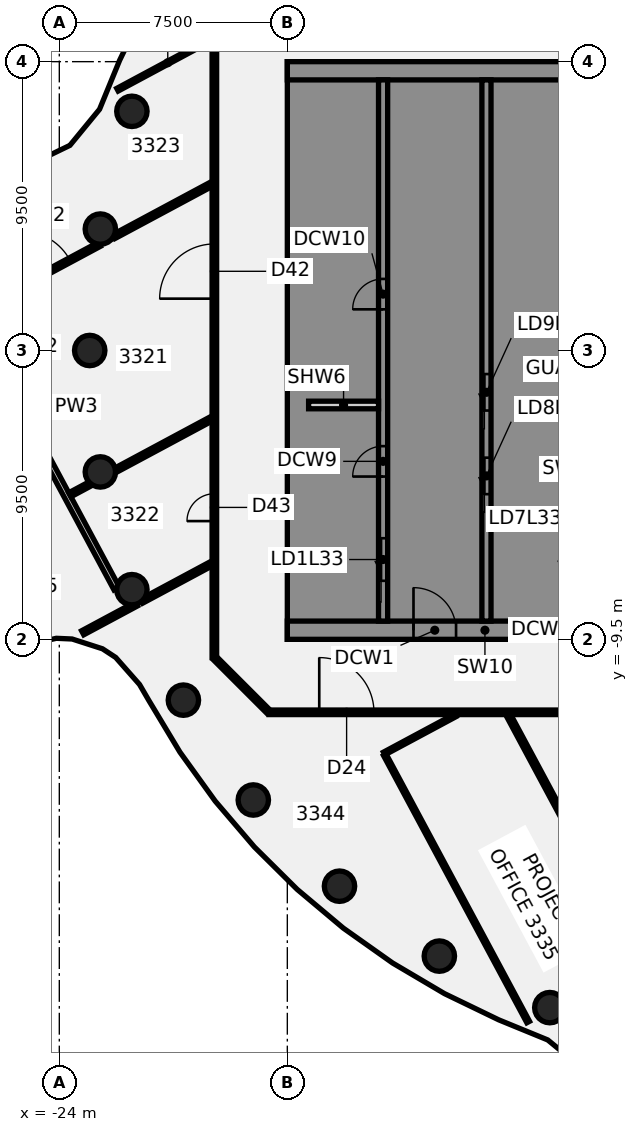
"""IFC4 building model, lengths in metres.
Left out: names, types, materials, properties, quantities, classifications, styles, units other than length and angle.
Written with IfcOpenShell. Run it as: python <this file> out.ifc"""

import sys

from ifc_helpers import new_model, si_unit, direction, frame, frame_2d, origin, origin_2d, place, context, subcontext, project, spatial, polyline, rectangle, circle, outline, extrude, element, fill, save


model = new_model("IFC4")
c1 = context("Model", 3, precision=1e-05, world=origin(), true_north=direction((0.0, 1.0)))
c2 = subcontext(c1, "Body", "Model", "MODEL_VIEW")
j1 = project(units=[si_unit("LENGTHUNIT", "METRE"), si_unit("PLANEANGLEUNIT", "RADIAN")], contexts=[c1])
p1 = place(None, origin())
s1 = spatial("IfcSite", under=j1, at=p1, CompositionType="ELEMENT")
p2 = place(p1, origin())
s2 = spatial("IfcBuilding", under=s1, at=p2, CompositionType="ELEMENT")
p3 = place(p2, frame((0.0, 0.0, 136.75)))
s3 = spatial("IfcBuildingStorey", under=s2, at=p3, CompositionType="ELEMENT", Elevation=136.75)
for number, where, z_axis, x_axis in (
    (1, (-21.613, 7.866, -0.14), (0.0, 0.0, 1.0), (1.0, 0.0, 0.0)),
    (2, (-22.651, 3.994, -0.14), (0.0, 0.0, 1.0), (1.0, 0.0, 0.0)),
    (3, (-23.0, 0.0, -0.14), (0.0, 0.0, 1.0), (1.0, 0.0, 0.0)),
    (4, (-22.651, -3.994, -0.14), (0.0, 0.0, 1.0), (1.0, 0.0, 0.0)),
    (5, (-21.613, -7.866, -0.14), (0.0, 0.0, 1.0), (1.0, 0.0, 0.0)),
    (6, (-19.919, -11.5, -0.14), (0.0, 0.0, 1.0), (1.0, 0.0, 0.0)),
    (7, (-17.619, -14.784, -0.14), (0.0, 0.0, 1.0), (1.0, 0.0, 0.0)),
    (8, (-14.784, -17.619, -0.14), (0.0, 0.0, 1.0), (1.0, 0.0, 0.0)),
    (9, (-11.5, -19.919, -0.14), (0.0, 0.0, 1.0), (1.0, 0.0, 0.0)),
    (10, (-7.866, -21.613, -0.14), (0.0, 0.0, 1.0), (1.0, 0.0, 0.0)),
):
    element("IfcColumn", number, at=place(p3, frame(where, z_axis=z_axis, x_axis=x_axis)), inside=s3, PredefinedType="COLUMN", context=c2, shape_type="SweptSolid", body=[
        extrude(circle(Radius=0.5, at=origin_2d()), origin(), (0.0, 0.0, 1.0), 3.75),
    ])
p4 = place(p3, frame((-28.515, 4.107, 0.0), z_axis=(0.0, 0.0, 1.0), x_axis=(0.472704031368, -0.881221254129, 0.0)))
e11 = element("IfcWall", 11, at=p4, inside=s3, PredefinedType="PARTITIONING", context=c2, shape_type="SweptSolid", body=[
    extrude(rectangle(XDim=13.545, YDim=0.2, at=frame_2d((6.772, 0.0))), origin(), (0.0, 0.0, 1.0), 3.01),
])
p5 = place(p4, frame((5.799, 0.0, 0.0)))
e12 = element("IfcOpeningElement", 12, at=p5, cuts=e11, PredefinedType="OPENING", context=c2, shape_type="SweptSolid", body=[
    extrude(rectangle(XDim=1.4, YDim=2.1, at=frame_2d((0.7, 1.05))), frame((0.0, 0.11, 0.0), z_axis=(0.0, -1.0, 0.0), x_axis=(1.0, 0.0, 0.0)), (0.0, 0.0, 1.0), 0.22),
])
p6 = place(p3, frame((-13.292, -13.299, 0.0), z_axis=(0.0, 0.0, 1.0), x_axis=(0.472694845197, -0.881226181706, 0.0)))
e13 = element("IfcWall", 13, at=p6, inside=s3, PredefinedType="PARTITIONING", context=c2, shape_type="SweptSolid", body=[
    extrude(rectangle(XDim=9.973, YDim=0.1, at=frame_2d((4.986, 0.0))), origin(), (0.0, 0.0, 1.0), 3.01),
])
p7 = place(p3, frame((-9.226, -11.992, 0.0), z_axis=(0.0, 0.0, 1.0), x_axis=(0.472684868369, -0.881231533262, 0.0)))
e14 = element("IfcWall", 14, at=p7, inside=s3, PredefinedType="PARTITIONING", context=c2, shape_type="SweptSolid", body=[
    extrude(rectangle(XDim=11.591, YDim=0.15, at=frame_2d((5.795, 0.0))), origin(), (0.0, 0.0, 1.0), 3.01),
])
p8 = place(p7, frame((6.795, 0.0, 0.0)))
e15 = element("IfcOpeningElement", 15, at=p8, cuts=e14, PredefinedType="OPENING", context=c2, shape_type="SweptSolid", body=[
    extrude(rectangle(XDim=0.9, YDim=2.1, at=frame_2d((0.45, 1.05))), frame((0.0, 0.085, 0.0), z_axis=(0.0, -1.0, 0.0), x_axis=(1.0, 0.0, 0.0)), (0.0, 0.0, 1.0), 0.17),
])
p9 = place(p3, frame((-18.872, -10.128, 0.0), z_axis=(0.0, 0.0, 1.0), x_axis=(0.707106781187, -0.707106781187, 0.0)))
e16 = element("IfcWall", 16, at=p9, inside=s3, PredefinedType="PARTITIONING", context=c2, shape_type="SweptSolid", body=[
    extrude(rectangle(XDim=2.465, YDim=0.15, at=frame_2d((1.232, 0.0))), origin(), (0.0, 0.0, 1.0), 3.01),
])
p10 = place(p3, frame((-17.1, -11.9, 0.0), z_axis=(0.0, 0.0, 1.0), x_axis=(1.0, 0.0, 0.0)))
e17 = element("IfcWall", 17, at=p10, inside=s3, PredefinedType="PARTITIONING", context=c2, shape_type="SweptSolid", body=[
    extrude(rectangle(XDim=34.165, YDim=0.15, at=frame_2d((17.083, 0.0))), origin(), (0.0, 0.0, 1.0), 3.01),
])
p11 = place(p10, frame((10.824, 0.0, 0.0)))
e18 = element("IfcOpeningElement", 18, at=p11, cuts=e17, PredefinedType="OPENING", context=c2, shape_type="SweptSolid", body=[
    extrude(rectangle(XDim=1.8, YDim=2.1, at=frame_2d((0.9, 1.05))), frame((0.0, 0.085, 0.0), z_axis=(0.0, -1.0, 0.0), x_axis=(1.0, 0.0, 0.0)), (0.0, 0.0, 1.0), 0.17),
])
p12 = place(p10, frame((1.65, 0.0, 0.0)))
e19 = element("IfcOpeningElement", 19, at=p12, cuts=e17, PredefinedType="OPENING", context=c2, shape_type="SweptSolid", body=[
    extrude(rectangle(XDim=1.8, YDim=2.1, at=frame_2d((0.9, 1.05))), frame((0.0, 0.085, 0.0), z_axis=(0.0, -1.0, 0.0), x_axis=(1.0, 0.0, 0.0)), (0.0, 0.0, 1.0), 0.17),
])
p13 = place(p10, frame((26.307, 0.0, 0.0)))
e20 = element("IfcOpeningElement", 20, at=p13, cuts=e17, PredefinedType="OPENING", context=c2, shape_type="SweptSolid", body=[
    extrude(rectangle(XDim=1.8, YDim=2.1, at=frame_2d((0.9, 1.05))), frame((0.0, 0.085, 0.0), z_axis=(0.0, -1.0, 0.0), x_axis=(1.0, 0.0, 0.0)), (0.0, 0.0, 1.0), 0.17),
])
p14 = place(p3, frame((-26.868, 1.247, 0.0), z_axis=(0.0, 0.0, 1.0), x_axis=(0.881240689848, 0.472667797249, 0.0)))
e21 = element("IfcWall", 21, at=p14, inside=s3, PredefinedType="PARTITIONING", context=c2, shape_type="SweptSolid", body=[
    extrude(rectangle(XDim=4.75, YDim=0.15, at=frame_2d((2.375, 0.0))), origin(), (0.0, 0.0, 1.0), 3.01),
])
p15 = place(p14, frame((1.85, 0.0, 0.0)))
e22 = element("IfcOpeningElement", 22, at=p15, cuts=e21, PredefinedType="OPENING", context=c2, shape_type="SweptSolid", body=[
    extrude(rectangle(XDim=1.8, YDim=2.1, at=frame_2d((0.9, 1.05))), frame((0.0, 0.085, 0.0), z_axis=(0.0, -1.0, 0.0), x_axis=(1.0, 0.0, 0.0)), (0.0, 0.0, 1.0), 0.17),
])
p16 = place(p3, frame((-22.207, 3.747, 0.0), z_axis=(0.0, 0.0, 1.0), x_axis=(0.881220117458, 0.47270615036, 0.0)))
e23 = element("IfcWall", 23, at=p16, inside=s3, PredefinedType="PARTITIONING", context=c2, shape_type="SweptSolid", body=[
    extrude(rectangle(XDim=3.647, YDim=0.15, at=frame_2d((1.824, 0.0))), origin(), (0.0, 0.0, 1.0), 3.01),
])
p17 = place(p3, frame((-23.653, -4.745, 0.0), z_axis=(0.0, 0.0, 1.0), x_axis=(0.881293800816, 0.472568763932, 0.0)))
e24 = element("IfcWall", 24, at=p17, inside=s3, PredefinedType="PARTITIONING", context=c2, shape_type="SweptSolid", body=[
    extrude(rectangle(XDim=0.78, YDim=0.15, at=frame_2d((0.39, 0.0))), origin(), (0.0, 0.0, 1.0), 3.01),
])
p18 = place(p3, frame((-22.155, -3.941, 0.0), z_axis=(0.0, 0.0, 1.0), x_axis=(0.881228008937, 0.472691438747, 0.0)))
e25 = element("IfcWall", 25, at=p18, inside=s3, PredefinedType="PARTITIONING", context=c2, shape_type="SweptSolid", body=[
    extrude(rectangle(XDim=3.589, YDim=0.15, at=frame_2d((1.794, 0.0))), origin(), (0.0, 0.0, 1.0), 3.01),
])
p19 = place(p3, frame((-23.232, -9.285, 0.0), z_axis=(0.0, 0.0, 1.0), x_axis=(0.881204789324, 0.472734723997, 0.0)))
e26 = element("IfcWall", 26, at=p19, inside=s3, PredefinedType="PARTITIONING", context=c2, shape_type="SweptSolid", body=[
    extrude(rectangle(XDim=2.006, YDim=0.15, at=frame_2d((1.003, 0.0))), origin(), (0.0, 0.0, 1.0), 3.01),
])
p20 = place(p3, frame((-21.296, -8.247, 0.0), z_axis=(0.0, 0.0, 1.0), x_axis=(0.881189680889, 0.472762885911, 0.0)))
e27 = element("IfcWall", 27, at=p20, inside=s3, PredefinedType="PARTITIONING", context=c2, shape_type="SweptSolid", body=[
    extrude(rectangle(XDim=2.615, YDim=0.15, at=frame_2d((1.307, 0.0))), origin(), (0.0, 0.0, 1.0), 3.01),
])
p21 = place(p3, frame((-22.087, 8.577, 0.0), z_axis=(0.0, 0.0, 1.0), x_axis=(0.881198580013, 0.472746298329, 0.0)))
e28 = element("IfcWall", 28, at=p21, inside=s3, PredefinedType="PARTITIONING", context=c2, shape_type="SweptSolid", body=[
    extrude(rectangle(XDim=3.755, YDim=0.1, at=frame_2d((1.878, 0.0))), origin(), (0.0, 0.0, 1.0), 3.01),
])
p22 = place(p3, frame((-13.315, -13.255, 0.0), z_axis=(0.0, 0.0, 1.0), x_axis=(0.881310541347, 0.472537543176, 0.0)))
e29 = element("IfcWall", 29, at=p22, inside=s3, PredefinedType="PARTITIONING", context=c2, shape_type="SweptSolid", body=[
    extrude(rectangle(XDim=2.657, YDim=0.1, at=frame_2d((1.329, 0.0))), origin(), (0.0, 0.0, 1.0), 3.01),
])
p23 = place(p3, frame((-18.9, -10.1, 0.0), z_axis=(0.0, 0.0, 1.0), x_axis=(0.0, 1.0, 0.0)))
e30 = element("IfcWall", 30, at=p23, inside=s3, PredefinedType="PARTITIONING", context=c2, shape_type="SweptSolid", body=[
    extrude(rectangle(XDim=20.2, YDim=0.15, at=frame_2d((10.1, 0.0))), origin(), (0.0, 0.0, 1.0), 3.01),
])
p24 = place(p23, frame((11.805, 0.0, 0.0)))
e31 = element("IfcOpeningElement", 31, at=p24, cuts=e30, PredefinedType="OPENING", context=c2, shape_type="SweptSolid", body=[
    extrude(rectangle(XDim=1.8, YDim=2.1, at=frame_2d((0.9, 1.05))), frame((0.0, 0.085, 0.0), z_axis=(0.0, -1.0, 0.0), x_axis=(1.0, 0.0, 0.0)), (0.0, 0.0, 1.0), 0.17),
])
p25 = place(p23, frame((4.489, 0.0, 0.0)))
e32 = element("IfcOpeningElement", 32, at=p25, cuts=e30, PredefinedType="OPENING", context=c2, shape_type="SweptSolid", body=[
    extrude(rectangle(XDim=0.9, YDim=2.1, at=frame_2d((0.45, 1.05))), frame((0.0, 0.085, 0.0), z_axis=(0.0, -1.0, 0.0), x_axis=(1.0, 0.0, 0.0)), (0.0, 0.0, 1.0), 0.17),
])
p26 = place(p3, frame((-16.5, -9.2, 0.0), z_axis=(0.0, 0.0, 1.0), x_axis=(1.0, 0.0, 0.0)))
e33 = element("IfcWall", 33, at=p26, inside=s3, PredefinedType="SHEAR", context=c2, shape_type="SweptSolid", body=[
    extrude(rectangle(XDim=13.0, YDim=0.6, at=frame_2d((6.5, 0.0))), origin(), (0.0, 0.0, 1.0), 3.61),
])
p27 = place(p26, frame((4.15, 0.0, 0.0)))
e34 = element("IfcOpeningElement", 34, at=p27, cuts=e33, PredefinedType="OPENING", context=c2, shape_type="SweptSolid", body=[
    extrude(rectangle(XDim=1.4, YDim=2.1, at=frame_2d((0.7, 1.05))), frame((0.0, 0.31, 0.0), z_axis=(0.0, -1.0, 0.0), x_axis=(1.0, 0.0, 0.0)), (0.0, 0.0, 1.0), 0.62),
])
p28 = place(p26, frame((10.125, 0.0, 0.0)))
e35 = element("IfcOpeningElement", 35, at=p28, cuts=e33, PredefinedType="OPENING", context=c2, shape_type="SweptSolid", body=[
    extrude(rectangle(XDim=1.4, YDim=2.1, at=frame_2d((0.7, 1.05))), frame((0.0, 0.31, 0.0), z_axis=(0.0, -1.0, 0.0), x_axis=(1.0, 0.0, 0.0)), (0.0, 0.0, 1.0), 0.62),
])
p29 = place(p3, origin())
e36 = element("IfcWall", 36, at=p29, inside=s3, PredefinedType="SHEAR", context=c2, shape_type="SweptSolid", body=[
    extrude(outline(polyline([(-13.5, -8.125), (-15.9, -8.125), (-15.9, -5.625), (-13.5, -5.625), (-13.5, -5.375), (-15.9, -5.375), (-15.9, 5.375), (-13.5, 5.375), (-13.5, 5.625), (-15.9, 5.625), (-15.9, 8.125), (-13.5, 8.125), (-13.5, 8.9), (-15.9, 8.9), (-16.5, 8.9), (-16.5, -8.9), (-15.9, -8.9), (-13.5, -8.9), (-13.5, -8.125)])), origin(), (0.0, 0.0, 1.0), 3.61),
])
p30 = place(p3, frame((-16.5, 9.2, 0.0), z_axis=(0.0, 0.0, 1.0), x_axis=(1.0, 0.0, 0.0)))
e37 = element("IfcWall", 37, at=p30, inside=s3, PredefinedType="SHEAR", context=c2, shape_type="SweptSolid", body=[
    extrude(rectangle(XDim=13.0, YDim=0.6, at=frame_2d((6.5, 0.0))), origin(), (0.0, 0.0, 1.0), 3.61),
])
p31 = place(p3, origin())
e38 = element("IfcWall", 38, at=p31, inside=s3, PredefinedType="SHEAR", context=c2, shape_type="SweptSolid", body=[
    extrude(outline(polyline([(-9.8, -5.375), (-9.8, -5.625), (-7.5, -5.625), (-7.2, -5.625), (-7.2, 8.9), (-7.5, 8.9), (-9.8, 8.9), (-9.8, 8.125), (-7.5, 8.125), (-7.5, 5.625), (-9.8, 5.625), (-9.8, 5.375), (-7.5, 5.375), (-7.5, 2.875), (-9.8, 2.875), (-9.8, 2.625), (-7.5, 2.625), (-7.5, 0.125), (-9.8, 0.125), (-9.8, -0.125), (-7.5, -0.125), (-7.5, -2.625), (-9.8, -2.625), (-9.8, -2.875), (-7.5, -2.875), (-7.5, -5.375), (-9.8, -5.375)])), origin(), (0.0, 0.0, 1.0), 3.61),
])
p32 = place(p3, origin())
e39 = element("IfcWall", 39, at=p32, inside=s3, PredefinedType="SHEAR", context=c2, shape_type="SweptSolid", body=[
    extrude(outline(polyline([(-7.5, -8.125), (-9.55, -8.125), (-9.55, -5.625), (-9.8, -5.625), (-9.8, -8.125), (-9.8, -8.9), (-7.5, -8.9), (-7.5, -8.125)])), origin(), (0.0, 0.0, 1.0), 3.61),
])
p33 = place(p3, frame((-13.35, -8.9, 0.0), z_axis=(0.0, 0.0, 1.0), x_axis=(0.0, 1.0, 0.0)))
e40 = element("IfcWall", 40, at=p33, inside=s3, PredefinedType="SHEAR", context=c2, shape_type="SweptSolid", body=[
    extrude(rectangle(XDim=17.8, YDim=0.3, at=frame_2d((8.9, 0.0))), origin(), (0.0, 0.0, 1.0), 3.61),
])
p34 = place(p33, frame((1.325, 0.0, 0.0)))
e41 = element("IfcOpeningElement", 41, at=p34, cuts=e40, PredefinedType="OPENING", context=c2, shape_type="SweptSolid", body=[
    extrude(rectangle(XDim=1.4, YDim=2.1, at=frame_2d((0.7, 1.05))), frame((0.0, 0.16, 0.0), z_axis=(0.0, -1.0, 0.0), x_axis=(1.0, 0.0, 0.0)), (0.0, 0.0, 1.0), 0.32),
])
p35 = place(p33, frame((4.754, 0.0, 0.0)))
e42 = element("IfcOpeningElement", 42, at=p35, cuts=e40, PredefinedType="OPENING", context=c2, shape_type="SweptSolid", body=[
    extrude(rectangle(XDim=1.0, YDim=2.1, at=frame_2d((0.5, 1.05))), frame((0.0, 0.16, 0.0), z_axis=(0.0, -1.0, 0.0), x_axis=(1.0, 0.0, 0.0)), (0.0, 0.0, 1.0), 0.32),
])
p36 = place(p33, frame((10.254, 0.0, 0.0)))
e43 = element("IfcOpeningElement", 43, at=p36, cuts=e40, PredefinedType="OPENING", context=c2, shape_type="SweptSolid", body=[
    extrude(rectangle(XDim=1.0, YDim=2.1, at=frame_2d((0.5, 1.05))), frame((0.0, 0.16, 0.0), z_axis=(0.0, -1.0, 0.0), x_axis=(1.0, 0.0, 0.0)), (0.0, 0.0, 1.0), 0.32),
])
p37 = place(p3, frame((-9.95, -8.9, 0.0), z_axis=(0.0, 0.0, 1.0), x_axis=(0.0, 1.0, 0.0)))
e44 = element("IfcWall", 44, at=p37, inside=s3, PredefinedType="SHEAR", context=c2, shape_type="SweptSolid", body=[
    extrude(rectangle(XDim=17.8, YDim=0.3, at=frame_2d((8.9, 0.0))), origin(), (0.0, 0.0, 1.0), 3.61),
])
p38 = place(p37, frame((4.175, 0.0, 0.0)))
e45 = element("IfcOpeningElement", 45, at=p38, cuts=e44, PredefinedType="OPENING", context=c2, shape_type="SweptSolid", body=[
    extrude(rectangle(XDim=1.2, YDim=2.1, at=frame_2d((0.6, 1.05))), frame((0.0, 0.16, 0.0), z_axis=(0.0, -1.0, 0.0), x_axis=(1.0, 0.0, 0.0)), (0.0, 0.0, 1.0), 0.32),
])
p39 = place(p37, frame((6.925, 0.0, 0.0)))
e46 = element("IfcOpeningElement", 46, at=p39, cuts=e44, PredefinedType="OPENING", context=c2, shape_type="SweptSolid", body=[
    extrude(rectangle(XDim=1.2, YDim=2.1, at=frame_2d((0.6, 1.05))), frame((0.0, 0.16, 0.0), z_axis=(0.0, -1.0, 0.0), x_axis=(1.0, 0.0, 0.0)), (0.0, 0.0, 1.0), 0.32),
])
p40 = place(p3, frame((-15.8, -1.792, 0.0), z_axis=(0.0, 0.0, 1.0), x_axis=(1.0, 0.0, 0.0)))
e47 = element("IfcWall", 47, at=p40, inside=s3, PredefinedType="PARTITIONING", context=c2, shape_type="SweptSolid", body=[
    extrude(rectangle(XDim=2.3, YDim=0.25, at=frame_2d((1.15, 0.0))), origin(), (0.0, 0.0, 1.0), 3.61),
])
p41 = place(p12, frame((1.8, 0.0, 0.0), z_axis=(0.0, 0.0, 1.0), x_axis=(-1.0, 0.0, 0.0)))
e48 = element("IfcDoor", 48, at=p41, inside=s3, OperationType="DOUBLE_DOOR_SINGLE_SWING", PredefinedType="DOOR", context=c2, shape_type="SweptSolid", body=[
    extrude(rectangle(XDim=1.8, YDim=2.1, at=frame_2d((0.9, 1.05))), frame((0.0, 0.025, 0.0), z_axis=(0.0, -1.0, 0.0), x_axis=(1.0, 0.0, 0.0)), (0.0, 0.0, 1.0), 0.05),
])
fill(e19, e48)
p42 = place(p15, origin())
e49 = element("IfcDoor", 49, at=p42, inside=s3, OperationType="DOUBLE_DOOR_SINGLE_SWING", PredefinedType="DOOR", context=c2, shape_type="SweptSolid", body=[
    extrude(rectangle(XDim=1.8, YDim=2.1, at=frame_2d((0.9, 1.05))), frame((0.0, 0.025, 0.0), z_axis=(0.0, -1.0, 0.0), x_axis=(1.0, 0.0, 0.0)), (0.0, 0.0, 1.0), 0.05),
])
fill(e22, e49)
p43 = place(p24, frame((1.8, 0.0, 0.0), z_axis=(0.0, 0.0, 1.0), x_axis=(-1.0, 0.0, 0.0)))
e50 = element("IfcDoor", 50, at=p43, inside=s3, OperationType="DOUBLE_DOOR_SINGLE_SWING", PredefinedType="DOOR", context=c2, shape_type="SweptSolid", body=[
    extrude(rectangle(XDim=1.8, YDim=2.1, at=frame_2d((0.9, 1.05))), frame((0.0, 0.025, 0.0), z_axis=(0.0, -1.0, 0.0), x_axis=(1.0, 0.0, 0.0)), (0.0, 0.0, 1.0), 0.05),
])
fill(e31, e50)
p44 = place(p25, origin())
e51 = element("IfcDoor", 51, at=p44, inside=s3, OperationType="SINGLE_SWING_RIGHT", PredefinedType="DOOR", context=c2, shape_type="SweptSolid", body=[
    extrude(rectangle(XDim=0.9, YDim=2.1, at=frame_2d((0.45, 1.05))), frame((0.0, 0.025, 0.0), z_axis=(0.0, -1.0, 0.0), x_axis=(1.0, 0.0, 0.0)), (0.0, 0.0, 1.0), 0.05),
])
fill(e32, e51)
p45 = place(p27, origin())
e52 = element("IfcDoor", 52, at=p45, inside=s3, OperationType="SINGLE_SWING_LEFT", PredefinedType="DOOR", context=c2, shape_type="SweptSolid", body=[
    extrude(rectangle(XDim=1.4, YDim=2.1, at=frame_2d((0.7, 1.05))), frame((0.0, 0.025, 0.0), z_axis=(0.0, -1.0, 0.0), x_axis=(1.0, 0.0, 0.0)), (0.0, 0.0, 1.0), 0.05),
])
fill(e34, e52)
p46 = place(p34, origin())
e53 = element("IfcDoor", 53, at=p46, inside=s3, OperationType="SLIDING_TO_LEFT", PredefinedType="DOOR", context=c2, shape_type="SweptSolid", body=[
    extrude(rectangle(XDim=1.4, YDim=2.1, at=frame_2d((0.7, 1.05))), frame((0.0, 0.025, 0.0), z_axis=(0.0, -1.0, 0.0), x_axis=(1.0, 0.0, 0.0)), (0.0, 0.0, 1.0), 0.05),
])
fill(e41, e53)
p47 = place(p38, origin())
e54 = element("IfcDoor", 54, at=p47, inside=s3, OperationType="SLIDING_TO_LEFT", PredefinedType="DOOR", context=c2, shape_type="SweptSolid", body=[
    extrude(rectangle(XDim=1.2, YDim=2.1, at=frame_2d((0.6, 1.05))), frame((0.0, 0.025, 0.0), z_axis=(0.0, -1.0, 0.0), x_axis=(1.0, 0.0, 0.0)), (0.0, 0.0, 1.0), 0.05),
])
fill(e45, e54)
p48 = place(p39, origin())
e55 = element("IfcDoor", 55, at=p48, inside=s3, OperationType="SLIDING_TO_LEFT", PredefinedType="DOOR", context=c2, shape_type="SweptSolid", body=[
    extrude(rectangle(XDim=1.2, YDim=2.1, at=frame_2d((0.6, 1.05))), frame((0.0, 0.025, 0.0), z_axis=(0.0, -1.0, 0.0), x_axis=(1.0, 0.0, 0.0)), (0.0, 0.0, 1.0), 0.05),
])
fill(e46, e55)
p49 = place(p35, origin())
e56 = element("IfcDoor", 56, at=p49, inside=s3, OperationType="SINGLE_SWING_LEFT", PredefinedType="DOOR", context=c2, shape_type="SweptSolid", body=[
    extrude(rectangle(XDim=1.0, YDim=2.1, at=frame_2d((0.5, 1.05))), frame((0.0, 0.025, 0.0), z_axis=(0.0, -1.0, 0.0), x_axis=(1.0, 0.0, 0.0)), (0.0, 0.0, 1.0), 0.05),
])
fill(e42, e56)
p50 = place(p36, origin())
e57 = element("IfcDoor", 57, at=p50, inside=s3, OperationType="SINGLE_SWING_LEFT", PredefinedType="DOOR", context=c2, shape_type="SweptSolid", body=[
    extrude(rectangle(XDim=1.0, YDim=2.1, at=frame_2d((0.5, 1.05))), frame((0.0, 0.025, 0.0), z_axis=(0.0, -1.0, 0.0), x_axis=(1.0, 0.0, 0.0)), (0.0, 0.0, 1.0), 0.05),
])
fill(e43, e57)
save(model, sys.argv[1])
